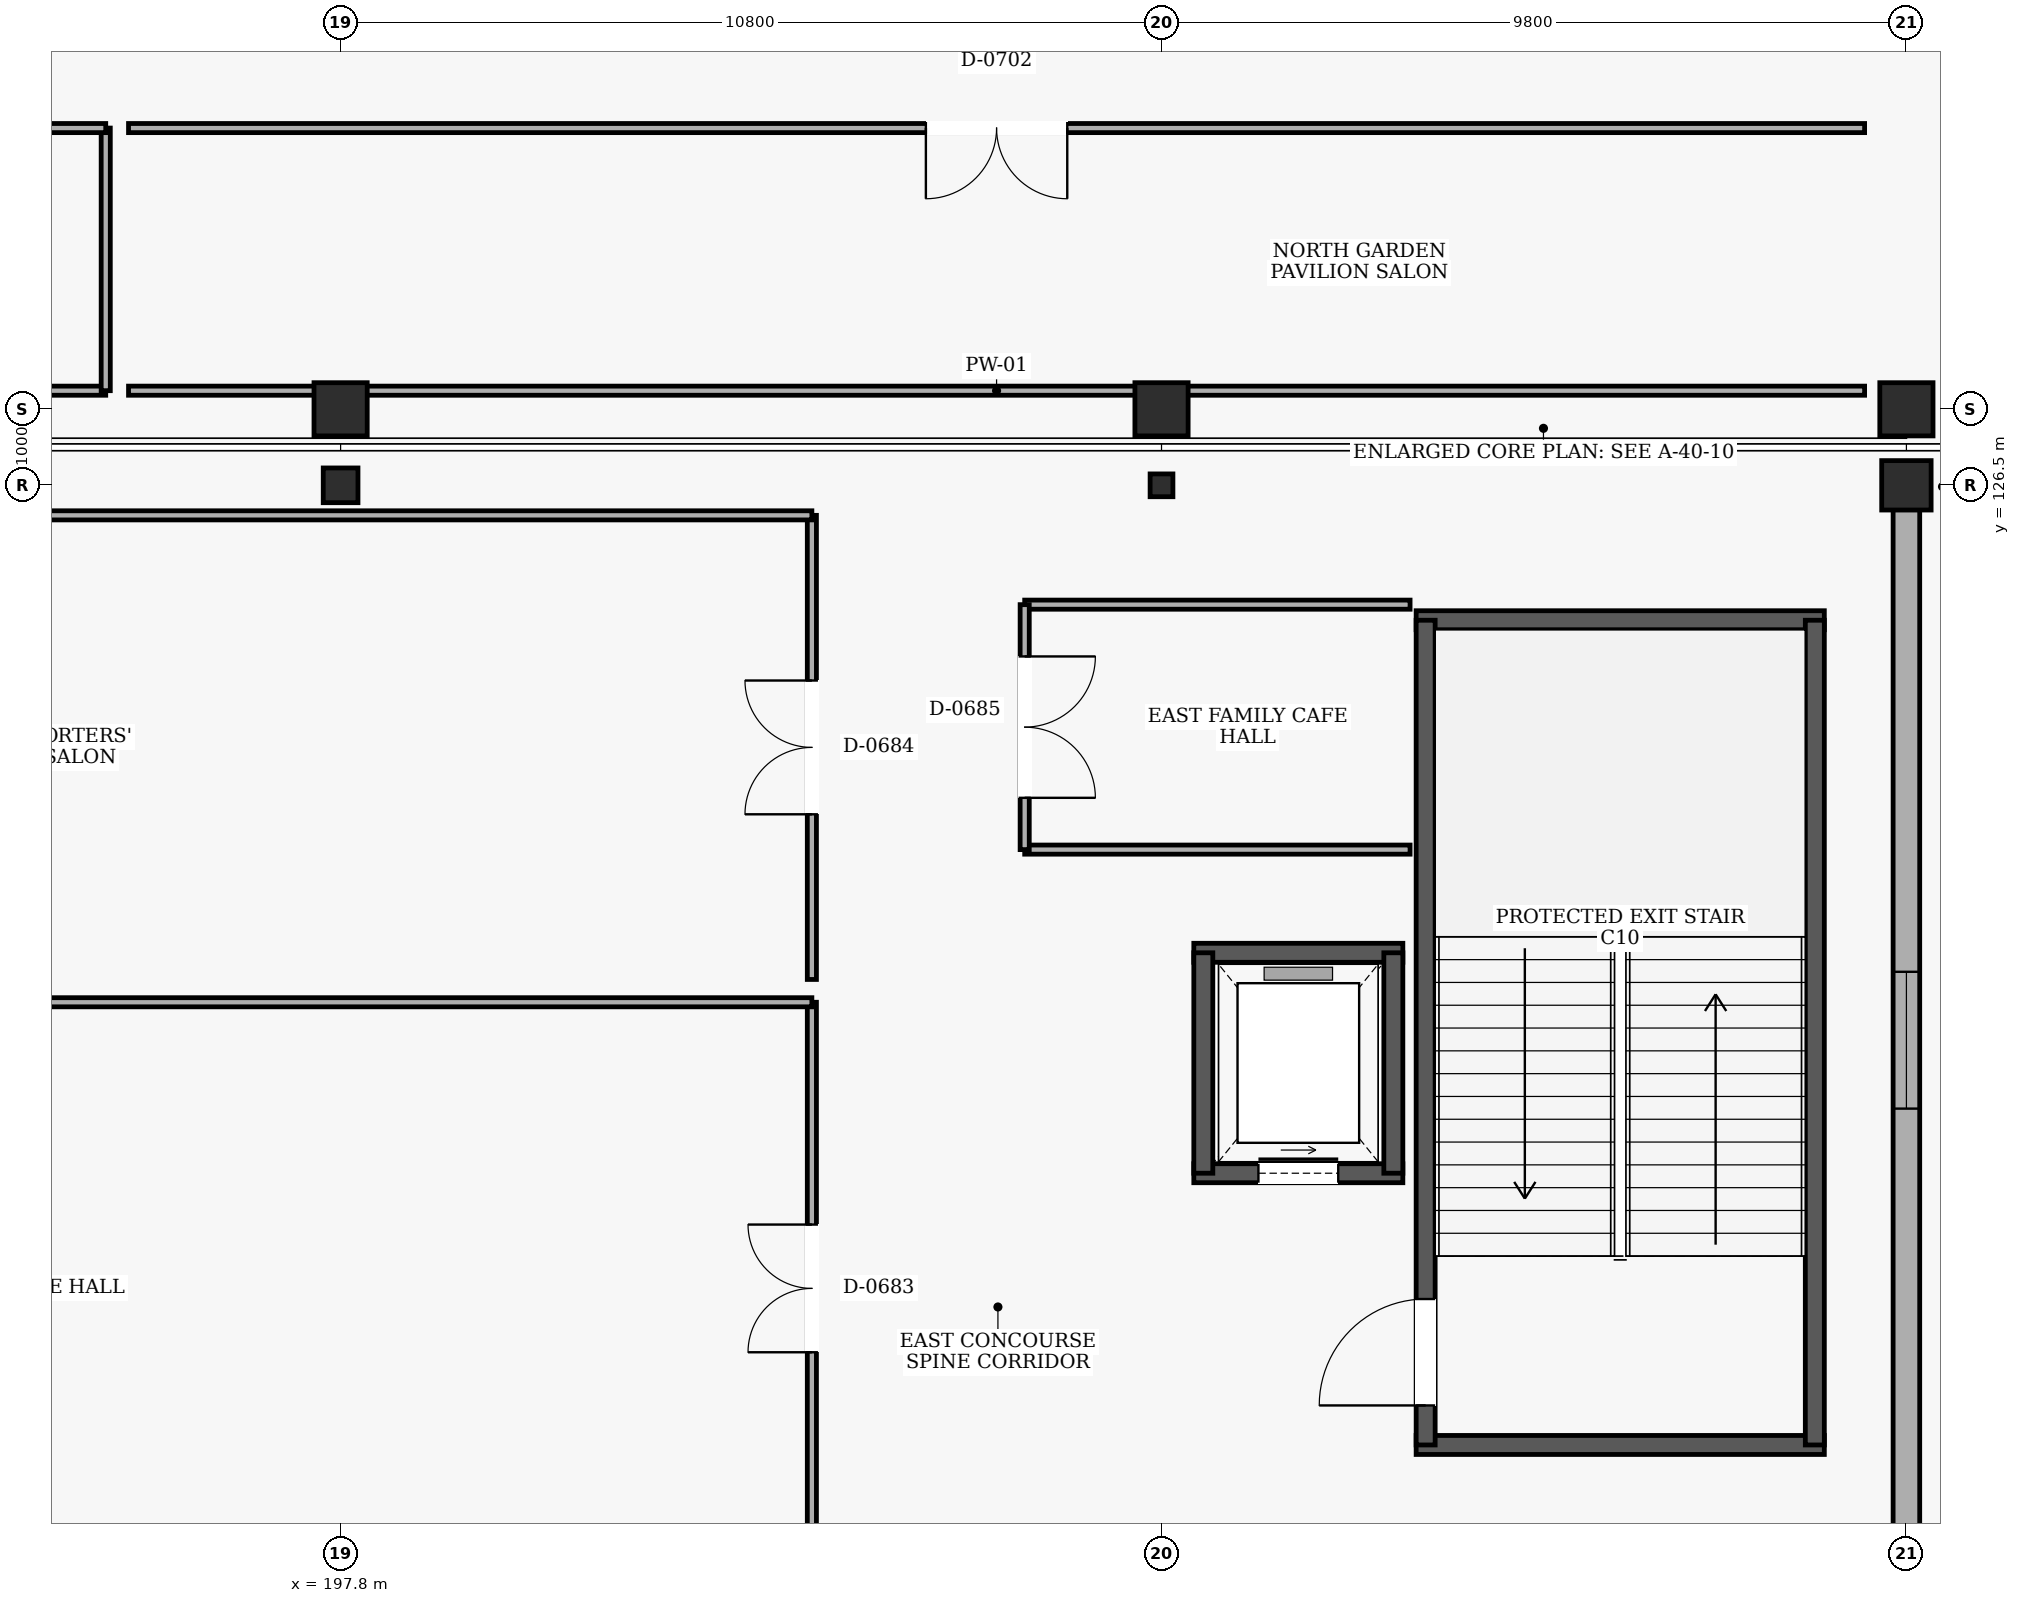
"""IFC4 building model, lengths in metres.
Left out: names, types, materials, properties, quantities, classifications, styles, units other than length and angle.
Written with IfcOpenShell. Run it as: python <this file> out.ifc"""

import sys

from ifc_helpers import new_model, si_unit, direction, frame, frame_2d, origin, origin_2d, place, context, subcontext, project, spatial, rectangle, hollow_rectangle, hollow_circle, extrude, element, fill, save


model = new_model("IFC4")
c1 = context("Model", 3, precision=1e-05, world=origin(), true_north=direction((0.0, 1.0)))
c2 = subcontext(c1, "Body", "Model", "MODEL_VIEW")
j1 = project(units=[si_unit("LENGTHUNIT", "METRE"), si_unit("PLANEANGLEUNIT", "RADIAN")], contexts=[c1])
p1 = place(None, origin())
s1 = spatial("IfcSite", under=j1, at=p1, CompositionType="ELEMENT")
p2 = place(p1, origin())
s2 = spatial("IfcBuilding", under=s1, at=p2, CompositionType="ELEMENT")
p3 = place(p2, frame((0.0, 0.0, 15.0)))
s3 = spatial("IfcBuildingStorey", under=s2, at=p3, CompositionType="ELEMENT", Elevation=15.0)
p4 = place(p3, frame((197.8, 126.5, 0.0), z_axis=(0.0, 0.0, 1.0), x_axis=(1.0, 0.0, 0.0)))
e1 = element("IfcColumn", 1, at=p4, inside=s3, PredefinedType="COLUMN", context=c2, shape_type="SweptSolid", body=[
    extrude(hollow_circle(Radius=0.229, WallThickness=0.02, at=origin_2d()), origin(), (0.0, 0.0, 1.0), 4.8),
])
p5 = place(p3, frame((197.8, 127.5, 0.0), z_axis=(0.0, 0.0, 1.0), x_axis=(1.0, 0.0, 0.0)))
e2 = element("IfcColumn", 2, at=p5, inside=s3, PredefinedType="COLUMN", context=c2, shape_type="SweptSolid", body=[
    extrude(rectangle(XDim=0.7, YDim=0.7, at=origin_2d()), origin(), (0.0, 0.0, 1.0), 4.8),
])
p6 = place(p3, frame((208.6, 126.5, 0.0), z_axis=(0.0, 0.0, 1.0), x_axis=(1.0, 0.0, 0.0)))
e3 = element("IfcColumn", 3, at=p6, inside=s3, PredefinedType="COLUMN", context=c2, shape_type="SweptSolid", body=[
    extrude(hollow_rectangle(XDim=0.3, YDim=0.3, WallThickness=0.016, at=origin_2d()), origin(), (0.0, 0.0, 1.0), 4.8),
])
p7 = place(p3, frame((208.6, 127.5, 0.0), z_axis=(0.0, 0.0, 1.0), x_axis=(1.0, 0.0, 0.0)))
e4 = element("IfcColumn", 4, at=p7, inside=s3, PredefinedType="COLUMN", context=c2, shape_type="SweptSolid", body=[
    extrude(rectangle(XDim=0.7, YDim=0.7, at=origin_2d()), origin(), (0.0, 0.0, 1.0), 4.8),
])
p8 = place(p3, frame((218.4, 126.5, 0.0), z_axis=(0.0, 0.0, 1.0), x_axis=(1.0, 0.0, 0.0)))
e5 = element("IfcColumn", 5, at=p8, inside=s3, PredefinedType="COLUMN", context=c2, shape_type="SweptSolid", body=[
    extrude(rectangle(XDim=0.65, YDim=0.65, at=origin_2d()), origin(), (0.0, 0.0, 1.0), 4.8),
])
p9 = place(p3, frame((218.4, 127.5, 0.0), z_axis=(0.0, 0.0, 1.0), x_axis=(1.0, 0.0, 0.0)))
e6 = element("IfcColumn", 6, at=p9, inside=s3, PredefinedType="COLUMN", context=c2, shape_type="SweptSolid", body=[
    extrude(rectangle(XDim=0.7, YDim=0.7, at=origin_2d()), origin(), (0.0, 0.0, 1.0), 4.8),
])
p10 = place(p3, frame((218.4, 126.18, 0.0), z_axis=(0.0, 0.0, 1.0), x_axis=(0.0, -1.0, 0.0)))
e7 = element("IfcWall", 7, at=p10, inside=s3, PredefinedType="SOLIDWALL", context=c2, shape_type="SweptSolid", body=[
    extrude(rectangle(XDim=13.96, YDim=0.35, at=frame_2d((6.98, 0.0))), origin(), (0.0, 0.0, 1.0), 3.58),
])
p11 = place(p10, frame((6.08, 0.0, 0.9)))
e8 = element("IfcOpeningElement", 8, at=p11, cuts=e7, PredefinedType="OPENING", context=c2, shape_type="SweptSolid", body=[
    extrude(rectangle(XDim=1.8, YDim=2.1, at=frame_2d((0.9, 1.05))), frame((0.0, 0.185, 0.0), z_axis=(0.0, -1.0, 0.0), x_axis=(1.0, 0.0, 0.0)), (0.0, 0.0, 1.0), 0.37),
])
for number, where, z_axis, x_axis in (
    (9, (211.95, 113.875, 0.0), (0.0, 0.0, 1.0), (1.0, 0.0, 0.0)),
    (10, (217.32, 124.725, 0.0), (0.0, 0.0, 1.0), (-1.0, 0.0, 0.0)),
):
    element("IfcWall", number, at=place(p3, frame(where, z_axis=z_axis, x_axis=x_axis)), inside=s3, PredefinedType="SHEAR", context=c2, shape_type="SweptSolid", body=[
        extrude(rectangle(XDim=5.37, YDim=0.25, at=frame_2d((2.685, 0.0))), origin(), (0.0, 0.0, 1.0), 4.5),
    ])
p12 = place(p3, frame((212.075, 113.875, 0.0), z_axis=(0.0, 0.0, 1.0), x_axis=(0.0, 1.0, 0.0)))
e11 = element("IfcWall", 11, at=p12, inside=s3, PredefinedType="SHEAR", context=c2, shape_type="SweptSolid", body=[
    extrude(rectangle(XDim=10.85, YDim=0.25, at=frame_2d((5.425, 0.0))), origin(), (0.0, 0.0, 1.0), 4.5),
])
p13 = place(p12, frame((0.52, 0.0, 0.0)))
e12 = element("IfcOpeningElement", 12, at=p13, cuts=e11, PredefinedType="OPENING", context=c2, shape_type="SweptSolid", body=[
    extrude(rectangle(XDim=1.4, YDim=2.15, at=frame_2d((0.7, 1.075))), frame((0.0, 0.135, 0.0), z_axis=(0.0, -1.0, 0.0), x_axis=(1.0, 0.0, 0.0)), (0.0, 0.0, 1.0), 0.27),
])
p14 = place(p3, frame((217.195, 113.875, 0.0), z_axis=(0.0, 0.0, 1.0), x_axis=(0.0, 1.0, 0.0)))
e13 = element("IfcWall", 13, at=p14, inside=s3, PredefinedType="SHEAR", context=c2, shape_type="SweptSolid", body=[
    extrude(rectangle(XDim=10.85, YDim=0.25, at=frame_2d((5.425, 0.0))), origin(), (0.0, 0.0, 1.0), 4.5),
])
p15 = place(p3, frame((209.025, 117.45, 0.0), z_axis=(0.0, 0.0, 1.0), x_axis=(1.0, 0.0, 0.0)))
e14 = element("IfcWall", 14, at=p15, inside=s3, PredefinedType="SHEAR", context=c2, shape_type="SweptSolid", body=[
    extrude(rectangle(XDim=2.75, YDim=0.25, at=frame_2d((1.375, 0.0))), origin(), (0.0, 0.0, 1.0), 4.5),
])
p16 = place(p15, frame((0.85, 0.0, 0.0)))
e15 = element("IfcOpeningElement", 15, at=p16, cuts=e14, PredefinedType="OPENING", context=c2, shape_type="SweptSolid", body=[
    extrude(rectangle(XDim=1.05, YDim=2.15, at=frame_2d((0.525, 1.075))), frame((0.0, 0.135, 0.0), z_axis=(0.0, -1.0, 0.0), x_axis=(1.0, 0.0, 0.0)), (0.0, 0.0, 1.0), 0.27),
])
p17 = place(p3, frame((211.775, 120.35, 0.0), z_axis=(0.0, 0.0, 1.0), x_axis=(-1.0, 0.0, 0.0)))
e16 = element("IfcWall", 16, at=p17, inside=s3, PredefinedType="SHEAR", context=c2, shape_type="SweptSolid", body=[
    extrude(rectangle(XDim=2.75, YDim=0.25, at=frame_2d((1.375, 0.0))), origin(), (0.0, 0.0, 1.0), 4.5),
])
for number, where, z_axis, x_axis in (
    (17, (209.15, 120.35, 0.0), (0.0, 0.0, 1.0), (0.0, -1.0, 0.0)),
    (18, (211.65, 117.45, 0.0), (0.0, 0.0, 1.0), (0.0, 1.0, 0.0)),
):
    element("IfcWall", number, at=place(p3, frame(where, z_axis=z_axis, x_axis=x_axis)), inside=s3, PredefinedType="SHEAR", context=c2, shape_type="SweptSolid", body=[
        extrude(rectangle(XDim=2.9, YDim=0.25, at=frame_2d((1.45, 0.0))), origin(), (0.0, 0.0, 1.0), 4.5),
    ])
p18 = place(p3, frame((204.0, 112.17, 0.0), z_axis=(0.0, 0.0, 1.0), x_axis=(0.0, 1.0, 0.0)))
e19 = element("IfcWall", 19, at=p18, inside=s3, PredefinedType="PARTITIONING", context=c2, shape_type="SweptSolid", body=[
    extrude(rectangle(XDim=7.529, YDim=0.12, at=frame_2d((3.765, 0.0))), origin(), (0.0, 0.0, 1.0), 4.5),
])
p19 = place(p18, frame((2.925, 0.0, 0.0)))
e20 = element("IfcOpeningElement", 20, at=p19, cuts=e19, PredefinedType="OPENING", context=c2, shape_type="SweptSolid", body=[
    extrude(rectangle(XDim=1.68, YDim=2.25, at=frame_2d((0.84, 1.125))), frame((0.0, 0.07, 0.0), z_axis=(0.0, -1.0, 0.0), x_axis=(1.0, 0.0, 0.0)), (0.0, 0.0, 1.0), 0.14),
])
p20 = place(p3, frame((204.0, 119.699, 0.0), z_axis=(0.0, 0.0, 1.0), x_axis=(-1.0, 0.0, 0.0)))
e21 = element("IfcWall", 21, at=p20, inside=s3, PredefinedType="PARTITIONING", context=c2, shape_type="SweptSolid", body=[
    extrude(rectangle(XDim=20.6, YDim=0.12, at=frame_2d((10.3, 0.0))), origin(), (0.0, 0.0, 1.0), 4.5),
])
p21 = place(p3, frame((204.0, 119.999, 0.0), z_axis=(0.0, 0.0, 1.0), x_axis=(0.0, 1.0, 0.0)))
e22 = element("IfcWall", 22, at=p21, inside=s3, PredefinedType="PARTITIONING", context=c2, shape_type="SweptSolid", body=[
    extrude(rectangle(XDim=6.106, YDim=0.12, at=frame_2d((3.053, 0.0))), origin(), (0.0, 0.0, 1.0), 4.5),
])
p22 = place(p21, frame((2.173, 0.0, 0.0)))
e23 = element("IfcOpeningElement", 23, at=p22, cuts=e22, PredefinedType="OPENING", context=c2, shape_type="SweptSolid", body=[
    extrude(rectangle(XDim=1.76, YDim=2.25, at=frame_2d((0.88, 1.125))), frame((0.0, 0.07, 0.0), z_axis=(0.0, -1.0, 0.0), x_axis=(1.0, 0.0, 0.0)), (0.0, 0.0, 1.0), 0.14),
])
p23 = place(p3, frame((204.0, 126.105, 0.0), z_axis=(0.0, 0.0, 1.0), x_axis=(-1.0, 0.0, 0.0)))
e24 = element("IfcWall", 24, at=p23, inside=s3, PredefinedType="PARTITIONING", context=c2, shape_type="SweptSolid", body=[
    extrude(rectangle(XDim=20.6, YDim=0.12, at=frame_2d((10.3, 0.0))), origin(), (0.0, 0.0, 1.0), 3.68),
])
for number, where, z_axis, x_axis in (
    (25, (206.8, 121.708, 0.0), (0.0, 0.0, 1.0), (1.0, 0.0, 0.0)),
    (26, (211.87, 124.93, 0.0), (0.0, 0.0, 1.0), (-1.0, 0.0, 0.0)),
):
    element("IfcWall", number, at=place(p3, frame(where, z_axis=z_axis, x_axis=x_axis)), inside=s3, PredefinedType="PARTITIONING", context=c2, shape_type="SweptSolid", body=[
        extrude(rectangle(XDim=5.07, YDim=0.12, at=frame_2d((2.535, 0.0))), origin(), (0.0, 0.0, 1.0), 4.5),
    ])
p24 = place(p3, frame((206.8, 124.93, 0.0), z_axis=(0.0, 0.0, 1.0), x_axis=(0.0, -1.0, 0.0)))
e27 = element("IfcWall", 27, at=p24, inside=s3, PredefinedType="PARTITIONING", context=c2, shape_type="SweptSolid", body=[
    extrude(rectangle(XDim=3.222, YDim=0.12, at=frame_2d((1.611, 0.0))), origin(), (0.0, 0.0, 1.0), 4.5),
])
p25 = place(p24, frame((0.681, 0.0, 0.0)))
e28 = element("IfcOpeningElement", 28, at=p25, cuts=e27, PredefinedType="OPENING", context=c2, shape_type="SweptSolid", body=[
    extrude(rectangle(XDim=1.86, YDim=2.3, at=frame_2d((0.93, 1.15))), frame((0.0, 0.07, 0.0), z_axis=(0.0, -1.0, 0.0), x_axis=(1.0, 0.0, 0.0)), (0.0, 0.0, 1.0), 0.14),
])
p26 = place(p3, frame((171.87, 127.745, 0.0), z_axis=(0.0, 0.0, 1.0), x_axis=(1.0, 0.0, 0.0)))
e29 = element("IfcWall", 29, at=p26, inside=s3, PredefinedType="PARTITIONING", context=c2, shape_type="SweptSolid", body=[
    extrude(rectangle(XDim=22.84, YDim=0.12, at=frame_2d((11.42, 0.0))), origin(), (0.0, 0.0, 1.0), 3.78),
])
p27 = place(p3, frame((194.71, 127.745, 0.0), z_axis=(0.0, 0.0, 1.0), x_axis=(0.0, 1.0, 0.0)))
e30 = element("IfcWall", 30, at=p27, inside=s3, PredefinedType="PARTITIONING", context=c2, shape_type="SweptSolid", body=[
    extrude(rectangle(XDim=3.455, YDim=0.12, at=frame_2d((1.728, 0.0))), origin(), (0.0, 0.0, 1.0), 4.5),
])
p28 = place(p3, frame((194.71, 131.2, 0.0), z_axis=(0.0, 0.0, 1.0), x_axis=(-1.0, 0.0, 0.0)))
e31 = element("IfcWall", 31, at=p28, inside=s3, PredefinedType="PARTITIONING", context=c2, shape_type="SweptSolid", body=[
    extrude(rectangle(XDim=22.84, YDim=0.12, at=frame_2d((11.42, 0.0))), origin(), (0.0, 0.0, 1.0), 4.5),
])
p29 = place(p28, frame((10.54, 0.0, 0.0)))
e32 = element("IfcOpeningElement", 32, at=p29, cuts=e31, PredefinedType="OPENING", context=c2, shape_type="SweptSolid", body=[
    extrude(rectangle(XDim=1.76, YDim=2.25, at=frame_2d((0.88, 1.125))), frame((0.0, 0.07, 0.0), z_axis=(0.0, -1.0, 0.0), x_axis=(1.0, 0.0, 0.0)), (0.0, 0.0, 1.0), 0.14),
])
p30 = place(p3, frame((195.01, 127.745, 0.0), z_axis=(0.0, 0.0, 1.0), x_axis=(1.0, 0.0, 0.0)))
e33 = element("IfcWall", 33, at=p30, inside=s3, PredefinedType="PARTITIONING", context=c2, shape_type="SweptSolid", body=[
    extrude(rectangle(XDim=22.84, YDim=0.12, at=frame_2d((11.42, 0.0))), origin(), (0.0, 0.0, 1.0), 3.68),
])
p31 = place(p3, frame((217.85, 131.2, 0.0), z_axis=(0.0, 0.0, 1.0), x_axis=(-1.0, 0.0, 0.0)))
e34 = element("IfcWall", 34, at=p31, inside=s3, PredefinedType="PARTITIONING", context=c2, shape_type="SweptSolid", body=[
    extrude(rectangle(XDim=22.84, YDim=0.12, at=frame_2d((11.42, 0.0))), origin(), (0.0, 0.0, 1.0), 4.5),
])
p32 = place(p31, frame((10.49, 0.0, 0.0)))
e35 = element("IfcOpeningElement", 35, at=p32, cuts=e34, PredefinedType="OPENING", context=c2, shape_type="SweptSolid", body=[
    extrude(rectangle(XDim=1.86, YDim=2.3, at=frame_2d((0.93, 1.15))), frame((0.0, 0.07, 0.0), z_axis=(0.0, -1.0, 0.0), x_axis=(1.0, 0.0, 0.0)), (0.0, 0.0, 1.0), 0.14),
])
p33 = place(p11, origin())
e36 = element("IfcWindow", 36, at=p33, inside=s3, PartitioningType="SINGLE_PANEL", PredefinedType="WINDOW", context=c2, shape_type="SweptSolid", body=[
    extrude(rectangle(XDim=1.8, YDim=2.1, at=frame_2d((0.9, 1.05))), frame((0.0, 0.03, 0.0), z_axis=(0.0, -1.0, 0.0), x_axis=(1.0, 0.0, 0.0)), (0.0, 0.0, 1.0), 0.06),
])
fill(e8, e36)
p34 = place(p13, frame((1.4, 0.0, 0.0), z_axis=(0.0, 0.0, 1.0), x_axis=(-1.0, 0.0, 0.0)))
e37 = element("IfcDoor", 37, at=p34, inside=s3, OperationType="SINGLE_SWING_RIGHT", PredefinedType="DOOR", context=c2, shape_type="SweptSolid", body=[
    extrude(rectangle(XDim=1.4, YDim=2.15, at=frame_2d((0.7, 1.075))), frame((0.0, 0.025, 0.0), z_axis=(0.0, -1.0, 0.0), x_axis=(1.0, 0.0, 0.0)), (0.0, 0.0, 1.0), 0.05),
])
fill(e12, e37)
p35 = place(p16, origin())
e38 = element("IfcDoor", 38, at=p35, inside=s3, OperationType="SLIDING_TO_LEFT", PredefinedType="DOOR", context=c2, shape_type="SweptSolid", body=[
    extrude(rectangle(XDim=1.05, YDim=2.15, at=frame_2d((0.525, 1.075))), frame((0.0, 0.025, 0.0), z_axis=(0.0, -1.0, 0.0), x_axis=(1.0, 0.0, 0.0)), (0.0, 0.0, 1.0), 0.05),
])
fill(e15, e38)
p36 = place(p19, origin())
e39 = element("IfcDoor", 39, at=p36, inside=s3, OperationType="DOUBLE_DOOR_SINGLE_SWING", PredefinedType="DOOR", context=c2, shape_type="SweptSolid", body=[
    extrude(rectangle(XDim=1.68, YDim=2.25, at=frame_2d((0.84, 1.125))), frame((0.0, 0.025, 0.0), z_axis=(0.0, -1.0, 0.0), x_axis=(1.0, 0.0, 0.0)), (0.0, 0.0, 1.0), 0.05),
])
fill(e20, e39)
p37 = place(p22, origin())
e40 = element("IfcDoor", 40, at=p37, inside=s3, OperationType="DOUBLE_DOOR_SINGLE_SWING", PredefinedType="DOOR", context=c2, shape_type="SweptSolid", body=[
    extrude(rectangle(XDim=1.76, YDim=2.25, at=frame_2d((0.88, 1.125))), frame((0.0, 0.025, 0.0), z_axis=(0.0, -1.0, 0.0), x_axis=(1.0, 0.0, 0.0)), (0.0, 0.0, 1.0), 0.05),
])
fill(e23, e40)
p38 = place(p25, origin())
e41 = element("IfcDoor", 41, at=p38, inside=s3, OperationType="DOUBLE_DOOR_SINGLE_SWING", PredefinedType="DOOR", context=c2, shape_type="SweptSolid", body=[
    extrude(rectangle(XDim=1.86, YDim=2.3, at=frame_2d((0.93, 1.15))), frame((0.0, 0.025, 0.0), z_axis=(0.0, -1.0, 0.0), x_axis=(1.0, 0.0, 0.0)), (0.0, 0.0, 1.0), 0.05),
])
fill(e28, e41)
p39 = place(p32, origin())
e42 = element("IfcDoor", 42, at=p39, inside=s3, OperationType="DOUBLE_DOOR_SINGLE_SWING", PredefinedType="DOOR", context=c2, shape_type="SweptSolid", body=[
    extrude(rectangle(XDim=1.86, YDim=2.3, at=frame_2d((0.93, 1.15))), frame((0.0, 0.025, 0.0), z_axis=(0.0, -1.0, 0.0), x_axis=(1.0, 0.0, 0.0)), (0.0, 0.0, 1.0), 0.05),
])
fill(e35, e42)
save(model, sys.argv[1])
